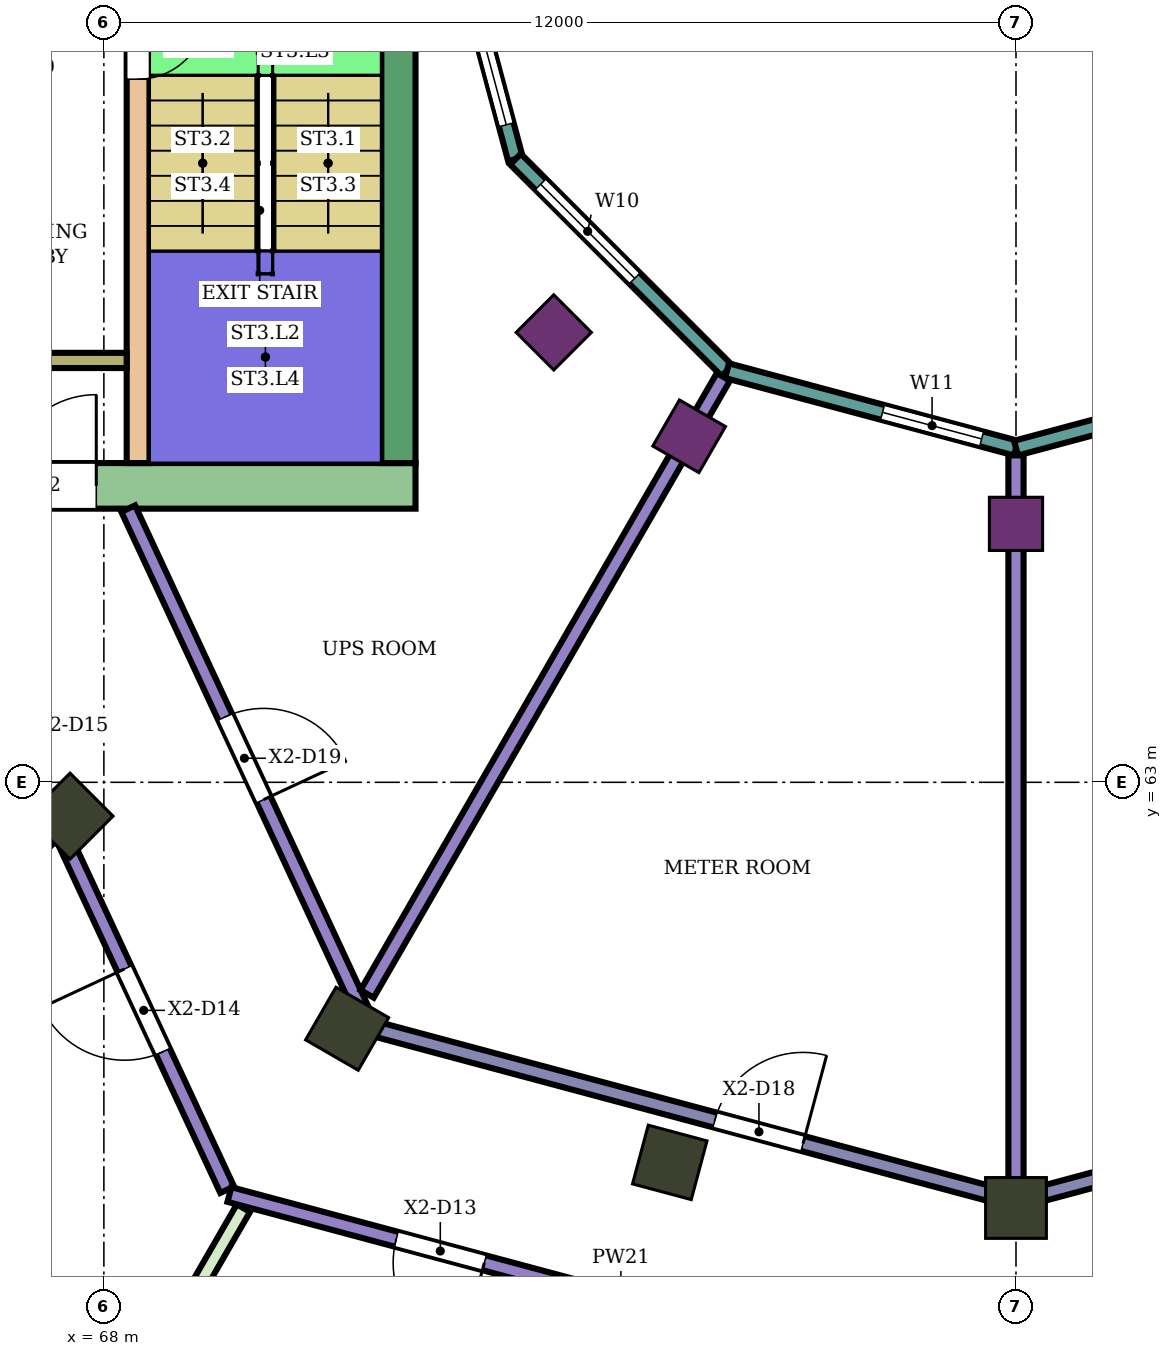
"""IFC4 building model, lengths in metres.
Left out: names, types, materials, properties, quantities, classifications, styles, units other than length and angle.
Written with IfcOpenShell. Run it as: python <this file> out.ifc"""

import sys

from ifc_helpers import new_model, si_unit, direction, frame, frame_2d, origin, origin_2d, place, context, subcontext, project, spatial, rectangle, extrude, element, fill, save


model = new_model("IFC4")
c1 = context("Model", 3, precision=1e-05, world=origin(), true_north=direction((0.0, 1.0)))
c2 = subcontext(c1, "Body", "Model", "MODEL_VIEW")
j1 = project(units=[si_unit("LENGTHUNIT", "METRE"), si_unit("PLANEANGLEUNIT", "RADIAN")], contexts=[c1])
p1 = place(None, origin())
s1 = spatial("IfcSite", under=j1, at=p1, CompositionType="ELEMENT")
p2 = place(p1, origin())
s2 = spatial("IfcBuilding", under=s1, at=p2, CompositionType="ELEMENT")
p3 = place(p2, frame((0.0, 0.0, 206.9)))
s3 = spatial("IfcBuildingStorey", under=s2, at=p3, CompositionType="ELEMENT", Elevation=206.9)
for number, where, z_axis, x_axis in (
    (1, (67.555, 62.555, 0.0), (0.0, 0.0, 1.0), (-0.707, -0.707, 0.0)),
    (2, (71.2, 59.758, 0.0), (0.0, 0.0, 1.0), (-0.5, -0.866, 0.0)),
    (3, (75.445, 58.0, 0.0), (0.0, 0.0, 1.0), (-0.259, -0.966, 0.0)),
    (4, (80.0, 57.4, 0.0), (0.0, 0.0, 1.0), (0.0, -1.0, 0.0)),
):
    element("IfcColumn", number, at=place(p3, frame(where, z_axis=z_axis, x_axis=x_axis)), inside=s3, PredefinedType="COLUMN", context=c2, shape_type="SweptSolid", body=[
        extrude(rectangle(XDim=0.8, YDim=0.8, at=origin_2d()), origin(), (0.0, 0.0, 1.0), 5.6),
    ])
for number, where, z_axis, x_axis in (
    (5, (73.919, 68.919, 0.0), (0.0, 0.0, 1.0), (-0.707, -0.707, 0.0)),
    (6, (75.7, 67.552, 0.0), (0.0, 0.0, 1.0), (-0.5, -0.866, 0.0)),
    (7, (80.0, 66.4, 0.0), (0.0, 0.0, 1.0), (0.0, -1.0, 0.0)),
):
    element("IfcColumn", number, at=place(p3, frame(where, z_axis=z_axis, x_axis=x_axis)), inside=s3, PredefinedType="COLUMN", context=c2, shape_type="SweptSolid", body=[
        extrude(rectangle(XDim=0.7, YDim=0.7, at=origin_2d()), origin(), (0.0, 0.0, 1.0), 5.6),
    ])
p4 = place(p3, frame((72.1, 66.9, 0.0), z_axis=(0.0, 0.0, 1.0), x_axis=(-1.0, 0.0, 0.0)))
e8 = element("IfcWall", 8, at=p4, inside=s3, PredefinedType="SHEAR", context=c2, shape_type="SweptSolid", body=[
    extrude(rectangle(XDim=14.9, YDim=0.6, at=frame_2d((7.45, 0.0))), origin(), (0.0, 0.0, 1.0), 5.28),
])
p5 = place(p4, frame((4.2, 0.0, 0.0)))
e9 = element("IfcOpeningElement", 9, at=p5, cuts=e8, PredefinedType="OPENING", context=c2, shape_type="SweptSolid", body=[
    extrude(rectangle(XDim=2.4, YDim=2.4, at=frame_2d((1.2, 1.2))), frame((0.0, 0.31, 0.0), z_axis=(0.0, -1.0, 0.0), x_axis=(1.0, 0.0, 0.0)), (0.0, 0.0, 1.0), 0.62),
])
p6 = place(p3, frame((71.875, 75.0, 0.0), z_axis=(0.0, 0.0, 1.0), x_axis=(0.0, -1.0, 0.0)))
e10 = element("IfcWall", 10, at=p6, inside=s3, PredefinedType="SHEAR", context=c2, shape_type="SweptSolid", body=[
    extrude(rectangle(XDim=7.8, YDim=0.45, at=frame_2d((3.9, 0.0))), origin(), (0.0, 0.0, 1.0), 5.28),
])
p7 = place(p3, frame((68.45, 75.0, 0.0), z_axis=(0.0, 0.0, 1.0), x_axis=(0.0, -1.0, 0.0)))
e11 = element("IfcWall", 11, at=p7, inside=s3, PredefinedType="SHEAR", context=c2, shape_type="SweptSolid", body=[
    extrude(rectangle(XDim=7.8, YDim=0.3, at=frame_2d((3.9, 0.0))), origin(), (0.0, 0.0, 1.0), 5.28),
])
p8 = place(p7, frame((1.85, 0.0, 0.0)))
e12 = element("IfcOpeningElement", 12, at=p8, cuts=e11, PredefinedType="OPENING", context=c2, shape_type="SweptSolid", body=[
    extrude(rectangle(XDim=0.9, YDim=2.1, at=frame_2d((0.45, 1.05))), frame((0.0, 0.16, 0.0), z_axis=(0.0, -1.0, 0.0), x_axis=(1.0, 0.0, 0.0)), (0.0, 0.0, 1.0), 0.32),
])
p9 = place(p3, frame((68.3, 68.55, 0.0), z_axis=(0.0, 0.0, 1.0), x_axis=(-1.0, 0.0, 0.0)))
e13 = element("IfcWall", 13, at=p9, inside=s3, PredefinedType="SHEAR", context=c2, shape_type="SweptSolid", body=[
    extrude(rectangle(XDim=4.35, YDim=0.2, at=frame_2d((2.175, 0.0))), origin(), (0.0, 0.0, 1.0), 5.28),
])
p10 = place(p3, frame((72.396, 75.0, 0.0), z_axis=(0.0, 0.0, 1.0), x_axis=(0.258789828301, -0.965933654434, 0.0)))
e14 = element("IfcWall", 14, at=p10, inside=s3, PredefinedType="NOTDEFINED", context=c2, shape_type="SweptSolid", body=[
    extrude(rectangle(XDim=3.936, YDim=0.2, at=frame_2d((1.968, 0.0))), origin(), (0.0, 0.0, 1.0), 5.6),
])
p11 = place(p10, frame((0.468, 0.0, 0.9)))
e15 = element("IfcOpeningElement", 15, at=p11, cuts=e14, PredefinedType="OPENING", context=c2, shape_type="SweptSolid", body=[
    extrude(rectangle(XDim=3.0, YDim=2.3, at=frame_2d((1.5, 1.15))), frame((0.0, 0.11, 0.0), z_axis=(0.0, -1.0, 0.0), x_axis=(1.0, 0.0, 0.0)), (0.0, 0.0, 1.0), 0.22),
])
p12 = place(p3, frame((73.415, 71.198, 0.0), z_axis=(0.0, 0.0, 1.0), x_axis=(0.707106781187, -0.707106781187, 0.0)))
e16 = element("IfcWall", 16, at=p12, inside=s3, PredefinedType="NOTDEFINED", context=c2, shape_type="SweptSolid", body=[
    extrude(rectangle(XDim=3.936, YDim=0.2, at=frame_2d((1.968, 0.0))), origin(), (0.0, 0.0, 1.0), 5.6),
])
p13 = place(p12, frame((0.468, 0.0, 0.9)))
e17 = element("IfcOpeningElement", 17, at=p13, cuts=e16, PredefinedType="OPENING", context=c2, shape_type="SweptSolid", body=[
    extrude(rectangle(XDim=1.75, YDim=2.3, at=frame_2d((0.875, 1.15))), frame((0.0, 0.11, 0.0), z_axis=(0.0, -1.0, 0.0), x_axis=(1.0, 0.0, 0.0)), (0.0, 0.0, 1.0), 0.22),
])
p14 = place(p3, frame((76.198, 68.415, 0.0), z_axis=(0.0, 0.0, 1.0), x_axis=(0.965933654434, -0.258789828301, 0.0)))
e18 = element("IfcWall", 18, at=p14, inside=s3, PredefinedType="NOTDEFINED", context=c2, shape_type="SweptSolid", body=[
    extrude(rectangle(XDim=3.936, YDim=0.2, at=frame_2d((1.968, 0.0))), origin(), (0.0, 0.0, 1.0), 5.6),
])
p15 = place(p14, frame((2.118, 0.0, 0.9)))
e19 = element("IfcOpeningElement", 19, at=p15, cuts=e18, PredefinedType="OPENING", context=c2, shape_type="SweptSolid", body=[
    extrude(rectangle(XDim=1.35, YDim=2.3, at=frame_2d((0.675, 1.15))), frame((0.0, 0.11, 0.0), z_axis=(0.0, -1.0, 0.0), x_axis=(1.0, 0.0, 0.0)), (0.0, 0.0, 1.0), 0.22),
])
p16 = place(p3, frame((80.0, 67.396, 0.0), z_axis=(0.0, 0.0, 1.0), x_axis=(0.965933654434, 0.258789828301, 0.0)))
e20 = element("IfcWall", 20, at=p16, inside=s3, PredefinedType="NOTDEFINED", context=c2, shape_type="SweptSolid", body=[
    extrude(rectangle(XDim=3.936, YDim=0.2, at=frame_2d((1.968, 0.0))), origin(), (0.0, 0.0, 1.0), 5.6),
])
p17 = place(p16, frame((2.118, 0.0, 0.9)))
e21 = element("IfcOpeningElement", 21, at=p17, cuts=e20, PredefinedType="OPENING", context=c2, shape_type="SweptSolid", body=[
    extrude(rectangle(XDim=1.35, YDim=2.3, at=frame_2d((0.675, 1.15))), frame((0.0, 0.11, 0.0), z_axis=(0.0, -1.0, 0.0), x_axis=(1.0, 0.0, 0.0)), (0.0, 0.0, 1.0), 0.22),
])
p18 = place(p3, frame((63.595, 58.596, 0.0), z_axis=(0.0, 0.0, 1.0), x_axis=(0.707106781187, 0.707106781187, 0.0)))
e22 = element("IfcWall", 22, at=p18, inside=s3, PredefinedType="PARTITIONING", context=c2, shape_type="SweptSolid", body=[
    extrude(rectangle(XDim=5.247, YDim=0.2, at=frame_2d((2.624, 0.0))), origin(), (0.0, 0.0, 1.0), 5.15),
])
p19 = place(p3, frame((66.15, 65.1, 0.0), z_axis=(0.0, 0.0, 1.0), x_axis=(0.421948011018, -0.906620028456, 0.0)))
e23 = element("IfcWall", 23, at=p19, inside=s3, PredefinedType="PARTITIONING", context=c2, shape_type="SweptSolid", body=[
    extrude(rectangle(XDim=8.228, YDim=0.2, at=frame_2d((4.114, 0.0))), origin(), (0.0, 0.0, 1.0), 5.15),
])
p20 = place(p19, frame((5.025, 0.0, 0.0)))
e24 = element("IfcOpeningElement", 24, at=p20, cuts=e23, PredefinedType="OPENING", context=c2, shape_type="SweptSolid", body=[
    extrude(rectangle(XDim=1.2, YDim=2.4, at=frame_2d((0.6, 1.2))), frame((0.0, 0.11, 0.0), z_axis=(0.0, -1.0, 0.0), x_axis=(1.0, 0.0, 0.0)), (0.0, 0.0, 1.0), 0.22),
])
p21 = place(p19, frame((0.897, 0.0, 0.0)))
e25 = element("IfcOpeningElement", 25, at=p21, cuts=e23, PredefinedType="OPENING", context=c2, shape_type="SweptSolid", body=[
    extrude(rectangle(XDim=1.2, YDim=2.4, at=frame_2d((0.6, 1.2))), frame((0.0, 0.11, 0.0), z_axis=(0.0, -1.0, 0.0), x_axis=(1.0, 0.0, 0.0)), (0.0, 0.0, 1.0), 0.22),
])
p22 = place(p3, frame((67.1, 52.659, 0.0), z_axis=(0.0, 0.0, 1.0), x_axis=(0.500021123982, 0.866013207504, 0.0)))
e26 = element("IfcWall", 26, at=p22, inside=s3, PredefinedType="PARTITIONING", context=c2, shape_type="SweptSolid", body=[
    extrude(rectangle(XDim=5.472, YDim=0.2, at=frame_2d((2.736, 0.0))), origin(), (0.0, 0.0, 1.0), 4.667),
])
p23 = place(p3, frame((68.32, 66.6, 0.0), z_axis=(0.0, 0.0, 1.0), x_axis=(0.422061116547, -0.90656737968, 0.0)))
e27 = element("IfcWall", 27, at=p23, inside=s3, PredefinedType="PARTITIONING", context=c2, shape_type="SweptSolid", body=[
    extrude(rectangle(XDim=7.46, YDim=0.2, at=frame_2d((3.73, 0.0))), origin(), (0.0, 0.0, 1.0), 5.15),
])
p24 = place(p23, frame((3.022, 0.0, 0.0)))
e28 = element("IfcOpeningElement", 28, at=p24, cuts=e27, PredefinedType="OPENING", context=c2, shape_type="SweptSolid", body=[
    extrude(rectangle(XDim=1.2, YDim=2.4, at=frame_2d((0.6, 1.2))), frame((0.0, 0.11, 0.0), z_axis=(0.0, -1.0, 0.0), x_axis=(1.0, 0.0, 0.0)), (0.0, 0.0, 1.0), 0.22),
])
p25 = place(p3, frame((69.652, 57.577, 0.0), z_axis=(0.0, 0.0, 1.0), x_axis=(0.965914220364, -0.25886235512, 0.0)))
e29 = element("IfcWall", 29, at=p25, inside=s3, PredefinedType="PARTITIONING", context=c2, shape_type="SweptSolid", body=[
    extrude(rectangle(XDim=10.663, YDim=0.2, at=frame_2d((5.332, 0.0))), origin(), (0.0, 0.0, 1.0), 5.15),
])
p26 = place(p25, frame((7.54, 0.0, 0.0)))
e30 = element("IfcOpeningElement", 30, at=p26, cuts=e29, PredefinedType="OPENING", context=c2, shape_type="SweptSolid", body=[
    extrude(rectangle(XDim=1.1, YDim=2.1, at=frame_2d((0.55, 1.05))), frame((0.0, 0.11, 0.0), z_axis=(0.0, -1.0, 0.0), x_axis=(1.0, 0.0, 0.0)), (0.0, 0.0, 1.0), 0.22),
])
p27 = place(p25, frame((2.272, 0.0, 0.0)))
e31 = element("IfcOpeningElement", 31, at=p27, cuts=e29, PredefinedType="OPENING", context=c2, shape_type="SweptSolid", body=[
    extrude(rectangle(XDim=1.2, YDim=2.4, at=frame_2d((0.6, 1.2))), frame((0.0, 0.11, 0.0), z_axis=(0.0, -1.0, 0.0), x_axis=(1.0, 0.0, 0.0)), (0.0, 0.0, 1.0), 0.22),
])
p28 = place(p3, frame((71.463, 60.216, 0.0), z_axis=(0.0, 0.0, 1.0), x_axis=(0.500032835289, 0.866006445491, 0.0)))
e32 = element("IfcWall", 32, at=p28, inside=s3, PredefinedType="PARTITIONING", context=c2, shape_type="SweptSolid", body=[
    extrude(rectangle(XDim=9.373, YDim=0.2, at=frame_2d((4.687, 0.0))), origin(), (0.0, 0.0, 1.0), 5.15),
])
p29 = place(p3, frame((71.498, 59.774, 0.0), z_axis=(0.0, 0.0, 1.0), x_axis=(0.965928196674, -0.258810198543, 0.0)))
e33 = element("IfcWall", 33, at=p29, inside=s3, PredefinedType="PARTITIONING", context=c2, shape_type="SweptSolid", body=[
    extrude(rectangle(XDim=8.672, YDim=0.2, at=frame_2d((4.336, 0.0))), origin(), (0.0, 0.0, 1.0), 4.78),
])
p30 = place(p29, frame((4.701, 0.0, 0.0)))
e34 = element("IfcOpeningElement", 34, at=p30, cuts=e33, PredefinedType="OPENING", context=c2, shape_type="SweptSolid", body=[
    extrude(rectangle(XDim=1.2, YDim=2.4, at=frame_2d((0.6, 1.2))), frame((0.0, 0.11, 0.0), z_axis=(0.0, -1.0, 0.0), x_axis=(1.0, 0.0, 0.0)), (0.0, 0.0, 1.0), 0.22),
])
p31 = place(p3, frame((80.0, 54.804, 0.0), z_axis=(0.0, 0.0, 1.0), x_axis=(0.965920507456, 0.258838894444, 0.0)))
e35 = element("IfcWall", 35, at=p31, inside=s3, PredefinedType="PARTITIONING", context=c2, shape_type="SweptSolid", body=[
    extrude(rectangle(XDim=10.643, YDim=0.2, at=frame_2d((5.322, 0.0))), origin(), (0.0, 0.0, 1.0), 5.15),
])
p32 = place(p31, frame((7.241, 0.0, 0.0)))
e36 = element("IfcOpeningElement", 36, at=p32, cuts=e35, PredefinedType="OPENING", context=c2, shape_type="SweptSolid", body=[
    extrude(rectangle(XDim=1.2, YDim=2.4, at=frame_2d((0.6, 1.2))), frame((0.0, 0.11, 0.0), z_axis=(0.0, -1.0, 0.0), x_axis=(1.0, 0.0, 0.0)), (0.0, 0.0, 1.0), 0.22),
])
p33 = place(p3, frame((80.0, 57.626, 0.0), z_axis=(0.0, 0.0, 1.0), x_axis=(0.0, 1.0, 0.0)))
e37 = element("IfcWall", 37, at=p33, inside=s3, PredefinedType="PARTITIONING", context=c2, shape_type="SweptSolid", body=[
    extrude(rectangle(XDim=9.675, YDim=0.2, at=frame_2d((4.837, 0.0))), origin(), (0.0, 0.0, 1.0), 5.15),
])
p34 = place(p3, frame((80.0, 57.496, 0.0), z_axis=(0.0, 0.0, 1.0), x_axis=(0.965931702874, 0.258797112392, 0.0)))
e38 = element("IfcWall", 38, at=p34, inside=s3, PredefinedType="PARTITIONING", context=c2, shape_type="SweptSolid", body=[
    extrude(rectangle(XDim=8.732, YDim=0.2, at=frame_2d((4.366, 0.0))), origin(), (0.0, 0.0, 1.0), 4.78),
])
p35 = place(p34, frame((2.901, 0.0, 0.0)))
e39 = element("IfcOpeningElement", 39, at=p35, cuts=e38, PredefinedType="OPENING", context=c2, shape_type="SweptSolid", body=[
    extrude(rectangle(XDim=1.2, YDim=2.4, at=frame_2d((0.6, 1.2))), frame((0.0, 0.11, 0.0), z_axis=(0.0, -1.0, 0.0), x_axis=(1.0, 0.0, 0.0)), (0.0, 0.0, 1.0), 0.22),
])
p36 = place(p11, origin())
e40 = element("IfcWindow", 40, at=p36, inside=s3, PartitioningType="SINGLE_PANEL", PredefinedType="WINDOW", context=c2, shape_type="SweptSolid", body=[
    extrude(rectangle(XDim=3.0, YDim=2.3, at=frame_2d((1.5, 1.15))), frame((0.0, 0.03, 0.0), z_axis=(0.0, -1.0, 0.0), x_axis=(1.0, 0.0, 0.0)), (0.0, 0.0, 1.0), 0.06),
])
fill(e15, e40)
p37 = place(p13, origin())
e41 = element("IfcWindow", 41, at=p37, inside=s3, PartitioningType="SINGLE_PANEL", PredefinedType="WINDOW", context=c2, shape_type="SweptSolid", body=[
    extrude(rectangle(XDim=1.75, YDim=2.3, at=frame_2d((0.875, 1.15))), frame((0.0, 0.03, 0.0), z_axis=(0.0, -1.0, 0.0), x_axis=(1.0, 0.0, 0.0)), (0.0, 0.0, 1.0), 0.06),
])
fill(e17, e41)
p38 = place(p15, origin())
e42 = element("IfcWindow", 42, at=p38, inside=s3, PartitioningType="SINGLE_PANEL", PredefinedType="WINDOW", context=c2, shape_type="SweptSolid", body=[
    extrude(rectangle(XDim=1.35, YDim=2.3, at=frame_2d((0.675, 1.15))), frame((0.0, 0.03, 0.0), z_axis=(0.0, -1.0, 0.0), x_axis=(1.0, 0.0, 0.0)), (0.0, 0.0, 1.0), 0.06),
])
fill(e19, e42)
p39 = place(p27, frame((1.2, 0.0, 0.0), z_axis=(0.0, 0.0, 1.0), x_axis=(-1.0, 0.0, 0.0)))
e43 = element("IfcDoor", 43, at=p39, inside=s3, OperationType="SINGLE_SWING_LEFT", PredefinedType="DOOR", context=c2, shape_type="SweptSolid", body=[
    extrude(rectangle(XDim=1.2, YDim=2.4, at=frame_2d((0.6, 1.2))), frame((0.0, 0.025, 0.0), z_axis=(0.0, -1.0, 0.0), x_axis=(1.0, 0.0, 0.0)), (0.0, 0.0, 1.0), 0.05),
])
fill(e31, e43)
p40 = place(p20, frame((1.2, 0.0, 0.0), z_axis=(0.0, 0.0, 1.0), x_axis=(-1.0, 0.0, 0.0)))
e44 = element("IfcDoor", 44, at=p40, inside=s3, OperationType="SINGLE_SWING_RIGHT", PredefinedType="DOOR", context=c2, shape_type="SweptSolid", body=[
    extrude(rectangle(XDim=1.2, YDim=2.4, at=frame_2d((0.6, 1.2))), frame((0.0, 0.025, 0.0), z_axis=(0.0, -1.0, 0.0), x_axis=(1.0, 0.0, 0.0)), (0.0, 0.0, 1.0), 0.05),
])
fill(e24, e44)
p41 = place(p30, origin())
e45 = element("IfcDoor", 45, at=p41, inside=s3, OperationType="SINGLE_SWING_RIGHT", PredefinedType="DOOR", context=c2, shape_type="SweptSolid", body=[
    extrude(rectangle(XDim=1.2, YDim=2.4, at=frame_2d((0.6, 1.2))), frame((0.0, 0.025, 0.0), z_axis=(0.0, -1.0, 0.0), x_axis=(1.0, 0.0, 0.0)), (0.0, 0.0, 1.0), 0.05),
])
fill(e34, e45)
p42 = place(p24, origin())
e46 = element("IfcDoor", 46, at=p42, inside=s3, OperationType="SINGLE_SWING_RIGHT", PredefinedType="DOOR", context=c2, shape_type="SweptSolid", body=[
    extrude(rectangle(XDim=1.2, YDim=2.4, at=frame_2d((0.6, 1.2))), frame((0.0, 0.025, 0.0), z_axis=(0.0, -1.0, 0.0), x_axis=(1.0, 0.0, 0.0)), (0.0, 0.0, 1.0), 0.05),
])
fill(e28, e46)
p43 = place(p8, origin())
e47 = element("IfcDoor", 47, at=p43, inside=s3, OperationType="SINGLE_SWING_LEFT", PredefinedType="DOOR", context=c2, shape_type="SweptSolid", body=[
    extrude(rectangle(XDim=0.9, YDim=2.1, at=frame_2d((0.45, 1.05))), frame((0.0, 0.025, 0.0), z_axis=(0.0, -1.0, 0.0), x_axis=(1.0, 0.0, 0.0)), (0.0, 0.0, 1.0), 0.05),
])
fill(e12, e47)
p44 = place(p5, frame((2.4, 0.0, 0.0), z_axis=(0.0, 0.0, 1.0), x_axis=(-1.0, 0.0, 0.0)))
e48 = element("IfcDoor", 48, at=p44, inside=s3, OperationType="DOUBLE_DOOR_SINGLE_SWING", PredefinedType="DOOR", context=c2, shape_type="SweptSolid", body=[
    extrude(rectangle(XDim=2.4, YDim=2.4, at=frame_2d((1.2, 1.2))), frame((0.0, 0.025, 0.0), z_axis=(0.0, -1.0, 0.0), x_axis=(1.0, 0.0, 0.0)), (0.0, 0.0, 1.0), 0.05),
])
fill(e9, e48)
save(model, sys.argv[1])
